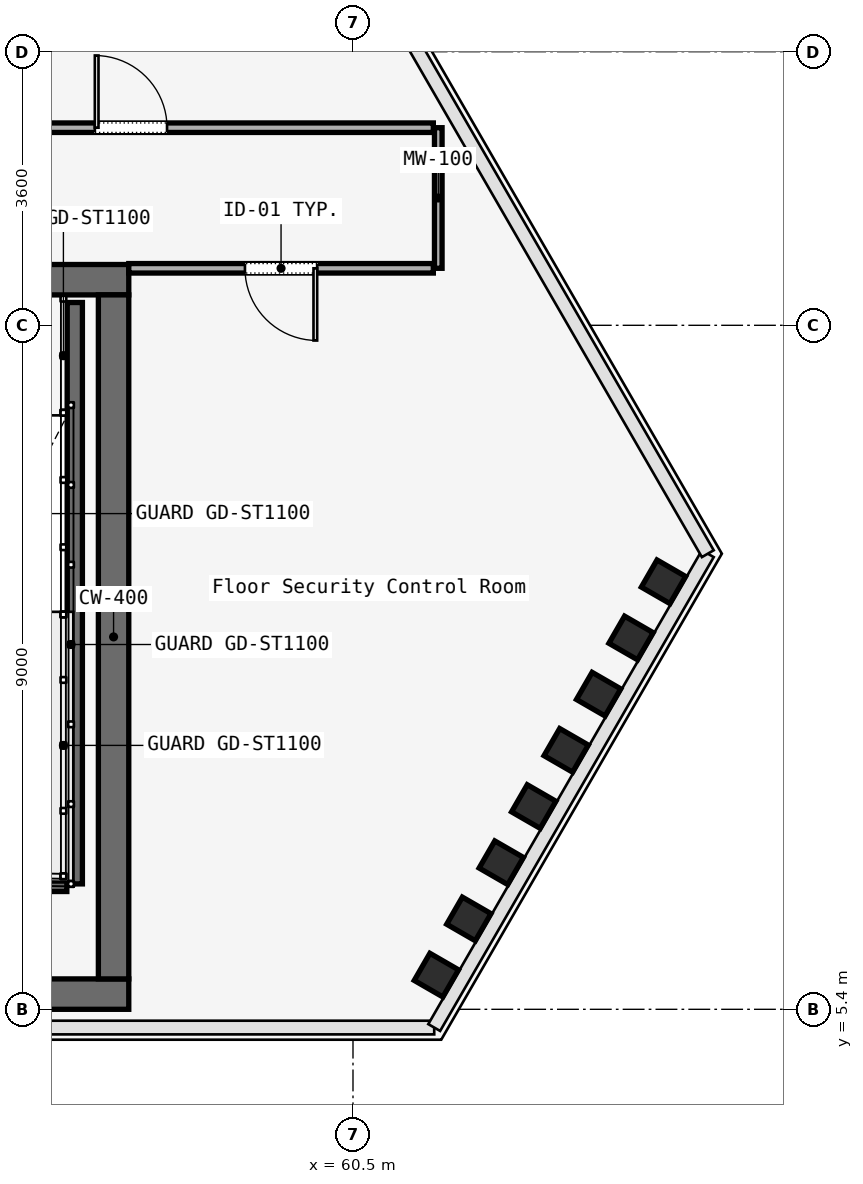
"""IFC4 building model, lengths in metres.
Left out: names, types, materials, properties, quantities, classifications, styles, units other than length and angle.
Written with IfcOpenShell. Run it as: python <this file> out.ifc"""

import sys

from ifc_helpers import new_model, si_unit, direction, frame, frame_2d, origin, origin_2d, place, context, subcontext, project, spatial, rectangle, i_section, extrude, element, fill, save


model = new_model("IFC4")
c1 = context("Model", 3, precision=1e-05, world=origin(), true_north=direction((0.0, 1.0)))
c2 = subcontext(c1, "Body", "Model", "MODEL_VIEW")
j1 = project(units=[si_unit("LENGTHUNIT", "METRE"), si_unit("PLANEANGLEUNIT", "RADIAN")], contexts=[c1])
p1 = place(None, origin())
s1 = spatial("IfcSite", under=j1, at=p1, CompositionType="ELEMENT")
p2 = place(p1, origin())
s2 = spatial("IfcBuilding", under=s1, at=p2, CompositionType="ELEMENT")
p3 = place(p2, frame((0.0, 0.0, 237.0)))
s3 = spatial("IfcBuildingStorey", under=s2, at=p3, CompositionType="ELEMENT", Elevation=237.0)
p4 = place(p3, frame((26.45, 15.0, 0.0), z_axis=(0.0, 0.0, 1.0), x_axis=(1.0, 0.0, 0.0)))
e1 = element("IfcWall", 1, at=p4, inside=s3, PredefinedType="SOLIDWALL", context=c2, shape_type="SweptSolid", body=[
    extrude(rectangle(XDim=31.1, YDim=0.4, at=frame_2d((15.55, 0.0))), origin(), (0.0, 0.0, 1.0), 3.58),
])
p5 = place(p4, frame((1.65, 0.0, 0.0)))
e2 = element("IfcOpeningElement", 2, at=p5, cuts=e1, PredefinedType="OPENING", context=c2, shape_type="SweptSolid", body=[
    extrude(rectangle(XDim=1.1, YDim=2.2, at=frame_2d((0.55, 1.1))), frame((0.0, 0.2, 0.0), z_axis=(0.0, -1.0, 0.0), x_axis=(1.0, 0.0, 0.0)), (0.0, 0.0, 1.0), 0.4),
])
p6 = place(p4, frame((13.65, 0.0, 0.0)))
e3 = element("IfcOpeningElement", 3, at=p6, cuts=e1, PredefinedType="OPENING", context=c2, shape_type="SweptSolid", body=[
    extrude(rectangle(XDim=1.1, YDim=2.2, at=frame_2d((0.55, 1.1))), frame((0.0, 0.2, 0.0), z_axis=(0.0, -1.0, 0.0), x_axis=(1.0, 0.0, 0.0)), (0.0, 0.0, 1.0), 0.4),
])
p7 = place(p4, frame((25.55, 0.0, 0.0)))
e4 = element("IfcOpeningElement", 4, at=p7, cuts=e1, PredefinedType="OPENING", context=c2, shape_type="SweptSolid", body=[
    extrude(rectangle(XDim=1.1, YDim=2.2, at=frame_2d((0.55, 1.1))), frame((0.0, 0.2, 0.0), z_axis=(0.0, -1.0, 0.0), x_axis=(1.0, 0.0, 0.0)), (0.0, 0.0, 1.0), 0.4),
])
p8 = place(p4, frame((19.35, 0.0, 0.0)))
e5 = element("IfcOpeningElement", 5, at=p8, cuts=e1, PredefinedType="OPENING", context=c2, shape_type="SweptSolid", body=[
    extrude(rectangle(XDim=1.1, YDim=2.2, at=frame_2d((0.55, 1.1))), frame((0.0, 0.2, 0.0), z_axis=(0.0, -1.0, 0.0), x_axis=(1.0, 0.0, 0.0)), (0.0, 0.0, 1.0), 0.4),
])
p9 = place(p4, frame((21.4, 0.0, 0.0)))
e6 = element("IfcOpeningElement", 6, at=p9, cuts=e1, PredefinedType="OPENING", context=c2, shape_type="SweptSolid", body=[
    extrude(rectangle(XDim=0.9, YDim=2.1, at=frame_2d((0.45, 1.05))), frame((0.0, 0.2, 0.0), z_axis=(0.0, -1.0, 0.0), x_axis=(1.0, 0.0, 0.0)), (0.0, 0.0, 1.0), 0.4),
])
p10 = place(p4, frame((6.54, 0.0, 0.0)))
e7 = element("IfcOpeningElement", 7, at=p10, cuts=e1, PredefinedType="OPENING", context=c2, shape_type="SweptSolid", body=[
    extrude(rectangle(XDim=0.95, YDim=2.2, at=frame_2d((0.475, 1.1))), frame((0.0, 0.2, 0.0), z_axis=(0.0, -1.0, 0.0), x_axis=(1.0, 0.0, 0.0)), (0.0, 0.0, 1.0), 0.4),
])
p11 = place(p4, frame((10.49, 0.0, 0.0)))
e8 = element("IfcOpeningElement", 8, at=p11, cuts=e1, PredefinedType="OPENING", context=c2, shape_type="SweptSolid", body=[
    extrude(rectangle(XDim=0.95, YDim=2.2, at=frame_2d((0.475, 1.1))), frame((0.0, 0.2, 0.0), z_axis=(0.0, -1.0, 0.0), x_axis=(1.0, 0.0, 0.0)), (0.0, 0.0, 1.0), 0.4),
])
p12 = place(p4, frame((23.35, 0.0, 0.0)))
e9 = element("IfcOpeningElement", 9, at=p12, cuts=e1, PredefinedType="OPENING", context=c2, shape_type="SweptSolid", body=[
    extrude(rectangle(XDim=1.3, YDim=2.3, at=frame_2d((0.65, 1.15))), frame((0.0, 0.2, 0.0), z_axis=(0.0, -1.0, 0.0), x_axis=(1.0, 0.0, 0.0)), (0.0, 0.0, 1.0), 0.4),
])
p13 = place(p3, frame((26.45, 5.6, 0.0), z_axis=(0.0, 0.0, 1.0), x_axis=(1.0, 0.0, 0.0)))
e10 = element("IfcWall", 10, at=p13, inside=s3, PredefinedType="SOLIDWALL", context=c2, shape_type="SweptSolid", body=[
    extrude(rectangle(XDim=31.1, YDim=0.4, at=frame_2d((15.55, 0.0))), origin(), (0.0, 0.0, 1.0), 3.58),
])
p14 = place(p3, frame((57.35, 5.8, 0.0), z_axis=(0.0, 0.0, 1.0), x_axis=(0.0, 1.0, 0.0)))
e11 = element("IfcWall", 11, at=p14, inside=s3, PredefinedType="SOLIDWALL", context=c2, shape_type="SweptSolid", body=[
    extrude(rectangle(XDim=9.0, YDim=0.4, at=frame_2d((4.5, 0.0))), origin(), (0.0, 0.0, 1.0), 3.58),
])
p15 = place(p3, frame((61.597, 5.85, 0.0), z_axis=(0.029241641936, -0.008929265953, 0.999532488009), x_axis=(-0.681858172917, 0.731005012271, 0.026478369666)))
e12 = element("IfcColumn", 12, at=p15, inside=s3, PredefinedType="COLUMN", context=c2, shape_type="SweptSolid", body=[
    extrude(i_section(OverallWidth=0.412, OverallDepth=0.435, WebThickness=0.036, FlangeThickness=0.044, FilletRadius=0.015, at=origin_2d()), origin(), (0.0, 0.0, 1.0), 3.582),
])
p16 = place(p3, frame((62.024, 6.589, 0.0), z_axis=(0.018879617772, -0.026854041163, 0.999461065028), x_axis=(-0.088781800771, 0.995645322005, 0.028428588085)))
e13 = element("IfcColumn", 13, at=p16, inside=s3, PredefinedType="COLUMN", context=c2, shape_type="SweptSolid", body=[
    extrude(i_section(OverallWidth=0.412, OverallDepth=0.435, WebThickness=0.036, FlangeThickness=0.044, FilletRadius=0.015, at=origin_2d()), origin(), (0.0, 0.0, 1.0), 3.582),
])
p17 = place(p3, frame((62.451, 7.328, 0.0), z_axis=(0.008583570146, -0.044689063616, 0.998964068381), x_axis=(0.327839496766, 0.943911103758, 0.039409295381)))
e14 = element("IfcColumn", 14, at=p17, inside=s3, PredefinedType="COLUMN", context=c2, shape_type="SweptSolid", body=[
    extrude(i_section(OverallWidth=0.412, OverallDepth=0.435, WebThickness=0.036, FlangeThickness=0.044, FilletRadius=0.015, at=origin_2d()), origin(), (0.0, 0.0, 1.0), 3.584),
])
p18 = place(p3, frame((62.878, 8.068, 0.0), z_axis=(-0.001701514809, -0.062547684371, 0.998040526245), x_axis=(0.52331914349, 0.850412101912, 0.054187922821)))
e15 = element("IfcColumn", 15, at=p18, inside=s3, PredefinedType="COLUMN", context=c2, shape_type="SweptSolid", body=[
    extrude(i_section(OverallWidth=0.412, OverallDepth=0.435, WebThickness=0.036, FlangeThickness=0.044, FilletRadius=0.015, at=origin_2d()), origin(), (0.0, 0.0, 1.0), 3.587),
])
p19 = place(p3, frame((63.305, 8.807, 0.0), z_axis=(-0.011962524537, -0.08033922729, 0.996695794395), x_axis=(0.621671409398, 0.7801131576, 0.070342875091)))
e16 = element("IfcColumn", 16, at=p19, inside=s3, PredefinedType="COLUMN", context=c2, shape_type="SweptSolid", body=[
    extrude(i_section(OverallWidth=0.412, OverallDepth=0.435, WebThickness=0.036, FlangeThickness=0.044, FilletRadius=0.015, at=origin_2d()), origin(), (0.0, 0.0, 1.0), 3.592),
])
p20 = place(p3, frame((63.732, 9.546, 0.0), z_axis=(-0.022254524787, -0.09797418839, 0.994940095953), x_axis=(0.678437450751, 0.729487471668, 0.087009505792)))
e17 = element("IfcColumn", 17, at=p20, inside=s3, PredefinedType="COLUMN", context=c2, shape_type="SweptSolid", body=[
    extrude(i_section(OverallWidth=0.412, OverallDepth=0.435, WebThickness=0.036, FlangeThickness=0.044, FilletRadius=0.015, at=origin_2d()), origin(), (0.0, 0.0, 1.0), 3.598),
])
p21 = place(p3, frame((64.158, 10.286, 0.0), z_axis=(-0.032496501638, -0.115565683949, 0.99276812503), x_axis=(0.714067106543, 0.692314653831, 0.103964356603)))
e18 = element("IfcColumn", 18, at=p21, inside=s3, PredefinedType="COLUMN", context=c2, shape_type="SweptSolid", body=[
    extrude(i_section(OverallWidth=0.412, OverallDepth=0.435, WebThickness=0.036, FlangeThickness=0.044, FilletRadius=0.015, at=origin_2d()), origin(), (0.0, 0.0, 1.0), 3.606),
])
p22 = place(p3, frame((64.585, 11.025, 0.0), z_axis=(-0.042676478189, -0.132958837902, 0.990202335704), x_axis=(0.738156757182, 0.663701816369, 0.120931802166)))
e19 = element("IfcColumn", 19, at=p22, inside=s3, PredefinedType="COLUMN", context=c2, shape_type="SweptSolid", body=[
    extrude(i_section(OverallWidth=0.412, OverallDepth=0.435, WebThickness=0.036, FlangeThickness=0.044, FilletRadius=0.015, at=origin_2d()), origin(), (0.0, 0.0, 1.0), 3.615),
])
p23 = place(p3, frame((56.84, 14.7, 0.0), z_axis=(0.0, 0.0, 1.0), x_axis=(0.0, -1.0, 0.0)))
e20 = element("IfcWall", 20, at=p23, inside=s3, PredefinedType="SOLIDWALL", context=c2, shape_type="SweptSolid", body=[
    extrude(rectangle(XDim=7.65, YDim=0.2, at=frame_2d((3.825, 0.0))), origin(), (0.0, 0.0, 1.0), 3.8),
])
p24 = place(p3, frame((53.62, 7.05, 0.0), z_axis=(0.0, 0.0, 1.0), x_axis=(1.0, 0.0, 0.0)))
e21 = element("IfcWall", 21, at=p24, inside=s3, PredefinedType="SOLIDWALL", context=c2, shape_type="SweptSolid", body=[
    extrude(rectangle(XDim=3.115, YDim=0.2, at=frame_2d((1.558, 0.0))), origin(), (0.0, 0.0, 1.0), 3.8),
])
p25 = place(p3, frame((61.622, 17.0, 0.0), z_axis=(0.0, 0.0, 1.0), x_axis=(0.0, -1.0, 0.0)))
e22 = element("IfcWall", 22, at=p25, inside=s3, PredefinedType="MOVABLE", context=c2, shape_type="SweptSolid", body=[
    extrude(rectangle(XDim=1.85, YDim=0.1, at=frame_2d((0.925, 0.0))), origin(), (0.0, 0.0, 1.0), 3.01),
])
p26 = place(p3, frame((61.557, 15.15, 0.0), z_axis=(0.0, 0.0, 1.0), x_axis=(-1.0, 0.0, 0.0)))
e23 = element("IfcWall", 23, at=p26, inside=s3, PredefinedType="PARTITIONING", context=c2, shape_type="SweptSolid", body=[
    extrude(rectangle(XDim=4.007, YDim=0.125, at=frame_2d((2.003, 0.0))), origin(), (0.0, 0.0, 1.0), 3.01),
])
p27 = place(p26, frame((1.529, 0.0, 0.0)))
e24 = element("IfcOpeningElement", 24, at=p27, cuts=e23, PredefinedType="OPENING", context=c2, shape_type="SweptSolid", body=[
    extrude(rectangle(XDim=0.95, YDim=2.2, at=frame_2d((0.475, 1.1))), frame((0.0, 0.062, 0.0), z_axis=(0.0, -1.0, 0.0), x_axis=(1.0, 0.0, 0.0)), (0.0, 0.0, 1.0), 0.125),
])
p28 = place(p3, frame((53.6, 17.0, 0.0), z_axis=(0.0, 0.0, 1.0), x_axis=(1.0, 0.0, 0.0)))
e25 = element("IfcWall", 25, at=p28, inside=s3, PredefinedType="PARTITIONING", context=c2, shape_type="SweptSolid", body=[
    extrude(rectangle(XDim=7.957, YDim=0.125, at=frame_2d((3.979, 0.0))), origin(), (0.0, 0.0, 1.0), 3.01),
])
p29 = place(p28, frame((3.503, 0.0, 0.0)))
e26 = element("IfcOpeningElement", 26, at=p29, cuts=e25, PredefinedType="OPENING", context=c2, shape_type="SweptSolid", body=[
    extrude(rectangle(XDim=0.95, YDim=2.2, at=frame_2d((0.475, 1.1))), frame((0.0, 0.062, 0.0), z_axis=(0.0, -1.0, 0.0), x_axis=(1.0, 0.0, 0.0)), (0.0, 0.0, 1.0), 0.125),
])
p30 = place(p27, origin())
e27 = element("IfcDoor", 27, at=p30, inside=s3, OperationType="SINGLE_SWING_LEFT", PredefinedType="DOOR", context=c2, shape_type="SweptSolid", body=[
    extrude(rectangle(XDim=0.95, YDim=2.2, at=frame_2d((0.475, 1.1))), frame((0.0, 0.025, 0.0), z_axis=(0.0, -1.0, 0.0), x_axis=(1.0, 0.0, 0.0)), (0.0, 0.0, 1.0), 0.05),
])
fill(e24, e27)
p31 = place(p29, origin())
e28 = element("IfcDoor", 28, at=p31, inside=s3, OperationType="SINGLE_SWING_RIGHT", PredefinedType="DOOR", context=c2, shape_type="SweptSolid", body=[
    extrude(rectangle(XDim=0.95, YDim=2.2, at=frame_2d((0.475, 1.1))), frame((0.0, 0.025, 0.0), z_axis=(0.0, -1.0, 0.0), x_axis=(1.0, 0.0, 0.0)), (0.0, 0.0, 1.0), 0.05),
])
fill(e26, e28)
save(model, sys.argv[1])
